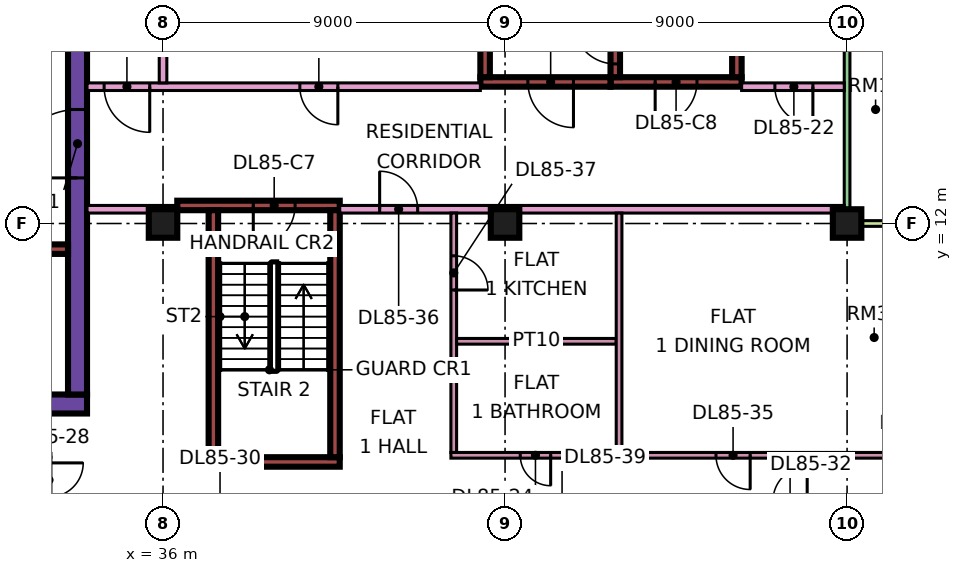
"""IFC4 building model, lengths in metres.
Left out: names, types, materials, properties, quantities, classifications, styles, units other than length and angle.
Written with IfcOpenShell. Run it as: python <this file> out.ifc"""

import sys

from ifc_helpers import new_model, si_unit, direction, frame, frame_2d, origin, origin_2d, place, context, subcontext, project, spatial, rectangle, extrude, element, fill, save


model = new_model("IFC4")
c1 = context("Model", 3, precision=1e-05, world=origin(), true_north=direction((0.0, 1.0)))
c2 = subcontext(c1, "Body", "Model", "MODEL_VIEW")
j1 = project(units=[si_unit("LENGTHUNIT", "METRE"), si_unit("PLANEANGLEUNIT", "RADIAN")], contexts=[c1])
p1 = place(None, origin())
s1 = spatial("IfcSite", under=j1, at=p1, CompositionType="ELEMENT")
p2 = place(p1, origin())
s2 = spatial("IfcBuilding", under=s1, at=p2, CompositionType="ELEMENT")
p3 = place(p2, frame((0.0, 0.0, 365.15)))
s3 = spatial("IfcBuildingStorey", under=s2, at=p3, CompositionType="ELEMENT", Elevation=365.15)
for number, where, z_axis, x_axis in (
    (1, (36.0, 12.0, 0.0), (0.0, 0.0, 1.0), (1.0, 0.0, 0.0)),
    (2, (45.0, 12.0, 0.0), (0.0, 0.0, 1.0), (1.0, 0.0, 0.0)),
    (3, (54.0, 12.0, 0.0), (0.0, 0.0, 1.0), (1.0, 0.0, 0.0)),
):
    element("IfcColumn", number, at=place(p3, frame(where, z_axis=z_axis, x_axis=x_axis)), inside=s3, PredefinedType="COLUMN", context=c2, shape_type="SweptSolid", body=[
        extrude(rectangle(XDim=0.75, YDim=0.75, at=origin_2d()), origin(), (0.0, 0.0, 1.0), 3.75),
    ])
p4 = place(p3, frame((9.0, 7.25, 0.0), z_axis=(0.0, 0.0, 1.0), x_axis=(1.0, 0.0, 0.0)))
e4 = element("IfcWall", 4, at=p4, inside=s3, PredefinedType="SHEAR", context=c2, shape_type="SweptSolid", body=[
    extrude(rectangle(XDim=25.0, YDim=0.5, at=frame_2d((12.5, 0.0))), origin(), (0.0, 0.0, 1.0), 3.75),
])
p5 = place(p3, frame((33.75, 7.5, 0.0), z_axis=(0.0, 0.0, 1.0), x_axis=(0.0, 1.0, 0.0)))
e5 = element("IfcWall", 5, at=p5, inside=s3, PredefinedType="SHEAR", context=c2, shape_type="SweptSolid", body=[
    extrude(rectangle(XDim=12.0, YDim=0.5, at=frame_2d((6.0, 0.0))), origin(), (0.0, 0.0, 1.0), 3.75),
])
p6 = place(p5, frame((5.7, 0.0, 0.0)))
e6 = element("IfcOpeningElement", 6, at=p6, cuts=e5, PredefinedType="OPENING", context=c2, shape_type="SweptSolid", body=[
    extrude(rectangle(XDim=1.8, YDim=2.4, at=frame_2d((0.9, 1.2))), frame((0.0, 0.26, 0.0), z_axis=(0.0, -1.0, 0.0), x_axis=(1.0, 0.0, 0.0)), (0.0, 0.0, 1.0), 0.52),
])
p7 = place(p3, frame((13.45, 11.325, 0.0), z_axis=(0.0, 0.0, 1.0), x_axis=(1.0, 0.0, 0.0)))
e7 = element("IfcWall", 7, at=p7, inside=s3, PredefinedType="SHEAR", context=c2, shape_type="SweptSolid", body=[
    extrude(rectangle(XDim=20.05, YDim=0.25, at=frame_2d((10.025, 0.0))), origin(), (0.0, 0.0, 1.0), 3.75),
])
p8 = place(p7, frame((4.925, 0.0, 0.0)))
e8 = element("IfcOpeningElement", 8, at=p8, cuts=e7, PredefinedType="OPENING", context=c2, shape_type="SweptSolid", body=[
    extrude(rectangle(XDim=0.9, YDim=2.1, at=frame_2d((0.45, 1.05))), frame((0.0, 0.135, 0.0), z_axis=(0.0, -1.0, 0.0), x_axis=(1.0, 0.0, 0.0)), (0.0, 0.0, 1.0), 0.27),
])
p9 = place(p7, frame((12.3, 0.0, 0.0)))
e9 = element("IfcOpeningElement", 9, at=p9, cuts=e7, PredefinedType="OPENING", context=c2, shape_type="SweptSolid", body=[
    extrude(rectangle(XDim=0.9, YDim=2.1, at=frame_2d((0.45, 1.05))), frame((0.0, 0.135, 0.0), z_axis=(0.0, -1.0, 0.0), x_axis=(1.0, 0.0, 0.0)), (0.0, 0.0, 1.0), 0.27),
])
p10 = place(p7, frame((16.825, 0.0, 0.0)))
e10 = element("IfcOpeningElement", 10, at=p10, cuts=e7, PredefinedType="OPENING", context=c2, shape_type="SweptSolid", body=[
    extrude(rectangle(XDim=0.9, YDim=2.1, at=frame_2d((0.45, 1.05))), frame((0.0, 0.135, 0.0), z_axis=(0.0, -1.0, 0.0), x_axis=(1.0, 0.0, 0.0)), (0.0, 0.0, 1.0), 0.27),
])
p11 = place(p3, frame((37.2, 5.725, 0.0), z_axis=(0.0, 0.0, 1.0), x_axis=(1.0, 0.0, 0.0)))
e11 = element("IfcWall", 11, at=p11, inside=s3, PredefinedType="SHEAR", context=c2, shape_type="SweptSolid", body=[
    extrude(rectangle(XDim=3.45, YDim=0.25, at=frame_2d((1.725, 0.0))), origin(), (0.0, 0.0, 1.0), 3.75),
])
p12 = place(p3, frame((36.375, 12.475, 0.0), z_axis=(0.0, 0.0, 1.0), x_axis=(1.0, 0.0, 0.0)))
e12 = element("IfcWall", 12, at=p12, inside=s3, PredefinedType="SHEAR", context=c2, shape_type="SweptSolid", body=[
    extrude(rectangle(XDim=4.275, YDim=0.25, at=frame_2d((2.137, 0.0))), origin(), (0.0, 0.0, 1.0), 3.75),
])
p13 = place(p12, frame((2.0, 0.0, 0.0)))
e13 = element("IfcOpeningElement", 13, at=p13, cuts=e12, PredefinedType="OPENING", context=c2, shape_type="SweptSolid", body=[
    extrude(rectangle(XDim=1.1, YDim=2.2, at=frame_2d((0.55, 1.1))), frame((0.0, 0.135, 0.0), z_axis=(0.0, -1.0, 0.0), x_axis=(1.0, 0.0, 0.0)), (0.0, 0.0, 1.0), 0.27),
])
for number, where, z_axis, x_axis in (
    (14, (37.325, 5.85, 0.0), (0.0, 0.0, 1.0), (0.0, 1.0, 0.0)),
    (15, (40.525, 5.85, 0.0), (0.0, 0.0, 1.0), (0.0, 1.0, 0.0)),
):
    element("IfcWall", number, at=place(p3, frame(where, z_axis=z_axis, x_axis=x_axis)), inside=s3, PredefinedType="SHEAR", context=c2, shape_type="SweptSolid", body=[
        extrude(rectangle(XDim=6.5, YDim=0.25, at=frame_2d((3.25, 0.0))), origin(), (0.0, 0.0, 1.0), 3.75),
    ])
p14 = place(p3, frame((47.775, 15.725, 0.0), z_axis=(0.0, 0.0, 1.0), x_axis=(1.0, 0.0, 0.0)))
e16 = element("IfcWall", 16, at=p14, inside=s3, PredefinedType="SHEAR", context=c2, shape_type="SweptSolid", body=[
    extrude(rectangle(XDim=3.45, YDim=0.25, at=frame_2d((1.725, 0.0))), origin(), (0.0, 0.0, 1.0), 3.75),
])
p15 = place(p14, frame((1.175, 0.0, 0.0)))
e17 = element("IfcOpeningElement", 17, at=p15, cuts=e16, PredefinedType="OPENING", context=c2, shape_type="SweptSolid", body=[
    extrude(rectangle(XDim=1.1, YDim=2.2, at=frame_2d((0.55, 1.1))), frame((0.0, 0.135, 0.0), z_axis=(0.0, -1.0, 0.0), x_axis=(1.0, 0.0, 0.0)), (0.0, 0.0, 1.0), 0.27),
])
p16 = place(p3, frame((47.9, 15.85, 0.0), z_axis=(0.0, 0.0, 1.0), x_axis=(0.0, 1.0, 0.0)))
e18 = element("IfcWall", 18, at=p16, inside=s3, PredefinedType="SHEAR", context=c2, shape_type="SweptSolid", body=[
    extrude(rectangle(XDim=6.5, YDim=0.25, at=frame_2d((3.25, 0.0))), origin(), (0.0, 0.0, 1.0), 3.75),
])
p17 = place(p16, frame((0.35, 0.0, 0.0)))
e19 = element("IfcOpeningElement", 19, at=p17, cuts=e18, PredefinedType="OPENING", context=c2, shape_type="SweptSolid", body=[
    extrude(rectangle(XDim=1.1, YDim=2.2, at=frame_2d((0.55, 1.1))), frame((0.0, 0.135, 0.0), z_axis=(0.0, -1.0, 0.0), x_axis=(1.0, 0.0, 0.0)), (0.0, 0.0, 1.0), 0.27),
])
p18 = place(p3, frame((51.1, 15.85, 0.0), z_axis=(0.0, 0.0, 1.0), x_axis=(0.0, 1.0, 0.0)))
e20 = element("IfcWall", 20, at=p18, inside=s3, PredefinedType="SHEAR", context=c2, shape_type="SweptSolid", body=[
    extrude(rectangle(XDim=6.5, YDim=0.25, at=frame_2d((3.25, 0.0))), origin(), (0.0, 0.0, 1.0), 3.75),
])
p19 = place(p3, frame((44.35, 15.725, 0.0), z_axis=(0.0, 0.0, 1.0), x_axis=(1.0, 0.0, 0.0)))
e21 = element("IfcWall", 21, at=p19, inside=s3, PredefinedType="SHEAR", context=c2, shape_type="SweptSolid", body=[
    extrude(rectangle(XDim=3.425, YDim=0.25, at=frame_2d((1.712, 0.0))), origin(), (0.0, 0.0, 1.0), 3.75),
])
p20 = place(p19, frame((1.25, 0.0, 0.0)))
e22 = element("IfcOpeningElement", 22, at=p20, cuts=e21, PredefinedType="OPENING", context=c2, shape_type="SweptSolid", body=[
    extrude(rectangle(XDim=1.2, YDim=2.2, at=frame_2d((0.6, 1.1))), frame((0.0, 0.135, 0.0), z_axis=(0.0, -1.0, 0.0), x_axis=(1.0, 0.0, 0.0)), (0.0, 0.0, 1.0), 0.27),
])
p21 = place(p3, frame((44.475, 15.85, 0.0), z_axis=(0.0, 0.0, 1.0), x_axis=(0.0, 1.0, 0.0)))
e23 = element("IfcWall", 23, at=p21, inside=s3, PredefinedType="SHEAR", context=c2, shape_type="SweptSolid", body=[
    extrude(rectangle(XDim=6.5, YDim=0.25, at=frame_2d((3.25, 0.0))), origin(), (0.0, 0.0, 1.0), 3.75),
])
p22 = place(p21, frame((1.75, 0.0, 0.0)))
e24 = element("IfcOpeningElement", 24, at=p22, cuts=e23, PredefinedType="OPENING", context=c2, shape_type="SweptSolid", body=[
    extrude(rectangle(XDim=1.1, YDim=2.2, at=frame_2d((0.55, 1.1))), frame((0.0, 0.135, 0.0), z_axis=(0.0, -1.0, 0.0), x_axis=(1.0, 0.0, 0.0)), (0.0, 0.0, 1.0), 0.27),
])
p23 = place(p21, frame((4.3, 0.0, 0.0)))
e25 = element("IfcOpeningElement", 25, at=p23, cuts=e23, PredefinedType="OPENING", context=c2, shape_type="SweptSolid", body=[
    extrude(rectangle(XDim=1.1, YDim=2.2, at=frame_2d((0.55, 1.1))), frame((0.0, 0.135, 0.0), z_axis=(0.0, -1.0, 0.0), x_axis=(1.0, 0.0, 0.0)), (0.0, 0.0, 1.0), 0.27),
])
p24 = place(p3, frame((54.0, 12.075, 0.0), z_axis=(0.0, 0.0, 1.0), x_axis=(0.0, 1.0, 0.0)))
e26 = element("IfcWall", 26, at=p24, inside=s3, PredefinedType="SOLIDWALL", context=c2, shape_type="SweptSolid", body=[
    extrude(rectangle(XDim=10.35, YDim=0.15, at=frame_2d((5.175, 0.0))), origin(), (0.0, 0.0, 1.0), 3.35),
])
p25 = place(p24, frame((4.538, 0.0, 0.45)))
e27 = element("IfcOpeningElement", 27, at=p25, cuts=e26, PredefinedType="OPENING", context=c2, shape_type="SweptSolid", body=[
    extrude(rectangle(XDim=4.8, YDim=2.4, at=frame_2d((2.4, 1.2))), frame((0.0, 0.085, 0.0), z_axis=(0.0, -1.0, 0.0), x_axis=(1.0, 0.0, 0.0)), (0.0, 0.0, 1.0), 0.17),
])
p26 = place(p3, frame((55.5, 12.0, 0.0), z_axis=(0.0, 0.0, 1.0), x_axis=(-1.0, 0.0, 0.0)))
e28 = element("IfcWall", 28, at=p26, inside=s3, PredefinedType="SOLIDWALL", context=c2, shape_type="SweptSolid", body=[
    extrude(rectangle(XDim=1.5, YDim=0.15, at=frame_2d((0.75, 0.0))), origin(), (0.0, 0.0, 1.0), 3.35),
])
p27 = place(p3, frame((34.0, 12.375, 0.0), z_axis=(0.0, 0.0, 1.0), x_axis=(1.0, 0.0, 0.0)))
e29 = element("IfcWall", 29, at=p27, inside=s3, PredefinedType="PARTITIONING", context=c2, shape_type="SweptSolid", body=[
    extrude(rectangle(XDim=2.376, YDim=0.2, at=frame_2d((1.188, 0.0))), origin(), (0.0, 0.0, 1.0), 3.35),
])
p28 = place(p3, frame((34.0, 15.6, 0.0), z_axis=(0.0, 0.0, 1.0), x_axis=(1.0, 0.0, 0.0)))
e30 = element("IfcWall", 30, at=p28, inside=s3, PredefinedType="PARTITIONING", context=c2, shape_type="SweptSolid", body=[
    extrude(rectangle(XDim=10.35, YDim=0.2, at=frame_2d((5.175, 0.0))), origin(), (0.0, 0.0, 1.0), 3.35),
])
p29 = place(p28, frame((5.6, 0.0, 0.0)))
e31 = element("IfcOpeningElement", 31, at=p29, cuts=e30, PredefinedType="OPENING", context=c2, shape_type="SweptSolid", body=[
    extrude(rectangle(XDim=1.0, YDim=2.1, at=frame_2d((0.5, 1.05))), frame((0.0, 0.11, 0.0), z_axis=(0.0, -1.0, 0.0), x_axis=(1.0, 0.0, 0.0)), (0.0, 0.0, 1.0), 0.22),
])
p30 = place(p28, frame((0.45, 0.0, 0.0)))
e32 = element("IfcOpeningElement", 32, at=p30, cuts=e30, PredefinedType="OPENING", context=c2, shape_type="SweptSolid", body=[
    extrude(rectangle(XDim=1.2, YDim=2.1, at=frame_2d((0.6, 1.05))), frame((0.0, 0.11, 0.0), z_axis=(0.0, -1.0, 0.0), x_axis=(1.0, 0.0, 0.0)), (0.0, 0.0, 1.0), 0.22),
])
p31 = place(p3, frame((36.0, 15.7, 0.0), z_axis=(0.0, 0.0, 1.0), x_axis=(0.0, 1.0, 0.0)))
e33 = element("IfcWall", 33, at=p31, inside=s3, PredefinedType="PARTITIONING", context=c2, shape_type="SweptSolid", body=[
    extrude(rectangle(XDim=8.3, YDim=0.2, at=frame_2d((4.15, 0.0))), origin(), (0.0, 0.0, 1.0), 3.35),
])
p32 = place(p3, frame((40.65, 12.375, 0.0), z_axis=(0.0, 0.0, 1.0), x_axis=(1.0, 0.0, 0.0)))
e34 = element("IfcWall", 34, at=p32, inside=s3, PredefinedType="PARTITIONING", context=c2, shape_type="SweptSolid", body=[
    extrude(rectangle(XDim=13.276, YDim=0.2, at=frame_2d((6.638, 0.0))), origin(), (0.0, 0.0, 1.0), 3.35),
])
p33 = place(p32, frame((1.05, 0.0, 0.0)))
e35 = element("IfcOpeningElement", 35, at=p33, cuts=e34, PredefinedType="OPENING", context=c2, shape_type="SweptSolid", body=[
    extrude(rectangle(XDim=1.0, YDim=2.1, at=frame_2d((0.5, 1.05))), frame((0.0, 0.11, 0.0), z_axis=(0.0, -1.0, 0.0), x_axis=(1.0, 0.0, 0.0)), (0.0, 0.0, 1.0), 0.22),
])
p34 = place(p3, frame((43.575, 5.9, 0.0), z_axis=(0.0, 0.0, 1.0), x_axis=(1.0, 0.0, 0.0)))
e36 = element("IfcWall", 36, at=p34, inside=s3, PredefinedType="PARTITIONING", context=c2, shape_type="SweptSolid", body=[
    extrude(rectangle(XDim=11.775, YDim=0.15, at=frame_2d((5.888, 0.0))), origin(), (0.0, 0.0, 1.0), 3.35),
])
p35 = place(p34, frame((1.825, 0.0, 0.0)))
e37 = element("IfcOpeningElement", 37, at=p35, cuts=e36, PredefinedType="OPENING", context=c2, shape_type="SweptSolid", body=[
    extrude(rectangle(XDim=0.8, YDim=2.1, at=frame_2d((0.4, 1.05))), frame((0.0, 0.085, 0.0), z_axis=(0.0, -1.0, 0.0), x_axis=(1.0, 0.0, 0.0)), (0.0, 0.0, 1.0), 0.17),
])
p36 = place(p34, frame((6.975, 0.0, 0.0)))
e38 = element("IfcOpeningElement", 38, at=p36, cuts=e36, PredefinedType="OPENING", context=c2, shape_type="SweptSolid", body=[
    extrude(rectangle(XDim=0.9, YDim=2.1, at=frame_2d((0.45, 1.05))), frame((0.0, 0.085, 0.0), z_axis=(0.0, -1.0, 0.0), x_axis=(1.0, 0.0, 0.0)), (0.0, 0.0, 1.0), 0.17),
])
p37 = place(p3, frame((43.65, 5.975, 0.0), z_axis=(0.0, 0.0, 1.0), x_axis=(0.0, 1.0, 0.0)))
e39 = element("IfcWall", 39, at=p37, inside=s3, PredefinedType="PARTITIONING", context=c2, shape_type="SweptSolid", body=[
    extrude(rectangle(XDim=6.3, YDim=0.15, at=frame_2d((3.15, 0.0))), origin(), (0.0, 0.0, 1.0), 3.35),
])
p38 = place(p37, frame((4.275, 0.0, 0.0)))
e40 = element("IfcOpeningElement", 40, at=p38, cuts=e39, PredefinedType="OPENING", context=c2, shape_type="SweptSolid", body=[
    extrude(rectangle(XDim=0.9, YDim=2.1, at=frame_2d((0.45, 1.05))), frame((0.0, 0.085, 0.0), z_axis=(0.0, -1.0, 0.0), x_axis=(1.0, 0.0, 0.0)), (0.0, 0.0, 1.0), 0.17),
])
p39 = place(p3, frame((43.725, 8.9, 0.0), z_axis=(0.0, 0.0, 1.0), x_axis=(1.0, 0.0, 0.0)))
e41 = element("IfcWall", 41, at=p39, inside=s3, PredefinedType="PARTITIONING", context=c2, shape_type="SweptSolid", body=[
    extrude(rectangle(XDim=4.2, YDim=0.15, at=frame_2d((2.1, 0.0))), origin(), (0.0, 0.0, 1.0), 3.35),
])
p40 = place(p3, frame((48.0, 5.975, 0.0), z_axis=(0.0, 0.0, 1.0), x_axis=(0.0, 1.0, 0.0)))
e42 = element("IfcWall", 42, at=p40, inside=s3, PredefinedType="PARTITIONING", context=c2, shape_type="SweptSolid", body=[
    extrude(rectangle(XDim=6.3, YDim=0.15, at=frame_2d((3.15, 0.0))), origin(), (0.0, 0.0, 1.0), 3.35),
])
p41 = place(p3, frame((51.225, 15.6, 0.0), z_axis=(0.0, 0.0, 1.0), x_axis=(1.0, 0.0, 0.0)))
e43 = element("IfcWall", 43, at=p41, inside=s3, PredefinedType="PARTITIONING", context=c2, shape_type="SweptSolid", body=[
    extrude(rectangle(XDim=2.701, YDim=0.2, at=frame_2d((1.351, 0.0))), origin(), (0.0, 0.0, 1.0), 3.35),
])
p42 = place(p41, frame((0.875, 0.0, 0.0)))
e44 = element("IfcOpeningElement", 44, at=p42, cuts=e43, PredefinedType="OPENING", context=c2, shape_type="SweptSolid", body=[
    extrude(rectangle(XDim=1.0, YDim=2.1, at=frame_2d((0.5, 1.05))), frame((0.0, 0.11, 0.0), z_axis=(0.0, -1.0, 0.0), x_axis=(1.0, 0.0, 0.0)), (0.0, 0.0, 1.0), 0.22),
])
p43 = place(p6, origin())
e45 = element("IfcDoor", 45, at=p43, inside=s3, OperationType="DOUBLE_DOOR_SINGLE_SWING", PredefinedType="DOOR", context=c2, shape_type="SweptSolid", body=[
    extrude(rectangle(XDim=1.8, YDim=2.4, at=frame_2d((0.9, 1.2))), frame((0.0, 0.025, 0.0), z_axis=(0.0, -1.0, 0.0), x_axis=(1.0, 0.0, 0.0)), (0.0, 0.0, 1.0), 0.05),
])
fill(e6, e45)
p44 = place(p13, frame((1.1, 0.0, 0.0), z_axis=(0.0, 0.0, 1.0), x_axis=(-1.0, 0.0, 0.0)))
e46 = element("IfcDoor", 46, at=p44, inside=s3, OperationType="SINGLE_SWING_LEFT", PredefinedType="DOOR", context=c2, shape_type="SweptSolid", body=[
    extrude(rectangle(XDim=1.1, YDim=2.2, at=frame_2d((0.55, 1.1))), frame((0.0, 0.025, 0.0), z_axis=(0.0, -1.0, 0.0), x_axis=(1.0, 0.0, 0.0)), (0.0, 0.0, 1.0), 0.05),
])
fill(e13, e46)
p45 = place(p15, frame((1.1, 0.0, 0.0), z_axis=(0.0, 0.0, 1.0), x_axis=(-1.0, 0.0, 0.0)))
e47 = element("IfcDoor", 47, at=p45, inside=s3, OperationType="SINGLE_SWING_LEFT", PredefinedType="DOOR", context=c2, shape_type="SweptSolid", body=[
    extrude(rectangle(XDim=1.1, YDim=2.2, at=frame_2d((0.55, 1.1))), frame((0.0, 0.025, 0.0), z_axis=(0.0, -1.0, 0.0), x_axis=(1.0, 0.0, 0.0)), (0.0, 0.0, 1.0), 0.05),
])
fill(e17, e47)
p46 = place(p20, origin())
e48 = element("IfcDoor", 48, at=p46, inside=s3, OperationType="SINGLE_SWING_RIGHT", PredefinedType="DOOR", context=c2, shape_type="SweptSolid", body=[
    extrude(rectangle(XDim=1.2, YDim=2.2, at=frame_2d((0.6, 1.1))), frame((0.0, 0.025, 0.0), z_axis=(0.0, -1.0, 0.0), x_axis=(1.0, 0.0, 0.0)), (0.0, 0.0, 1.0), 0.05),
])
fill(e22, e48)
p47 = place(p17, frame((1.1, 0.0, 0.0), z_axis=(0.0, 0.0, 1.0), x_axis=(-1.0, 0.0, 0.0)))
e49 = element("IfcDoor", 49, at=p47, inside=s3, OperationType="SINGLE_SWING_RIGHT", PredefinedType="DOOR", context=c2, shape_type="SweptSolid", body=[
    extrude(rectangle(XDim=1.1, YDim=2.2, at=frame_2d((0.55, 1.1))), frame((0.0, 0.025, 0.0), z_axis=(0.0, -1.0, 0.0), x_axis=(1.0, 0.0, 0.0)), (0.0, 0.0, 1.0), 0.05),
])
fill(e19, e49)
p48 = place(p29, origin())
e50 = element("IfcDoor", 50, at=p48, inside=s3, OperationType="SINGLE_SWING_RIGHT", PredefinedType="DOOR", context=c2, shape_type="SweptSolid", body=[
    extrude(rectangle(XDim=1.0, YDim=2.1, at=frame_2d((0.5, 1.05))), frame((0.0, 0.025, 0.0), z_axis=(0.0, -1.0, 0.0), x_axis=(1.0, 0.0, 0.0)), (0.0, 0.0, 1.0), 0.05),
])
fill(e31, e50)
p49 = place(p30, origin())
e51 = element("IfcDoor", 51, at=p49, inside=s3, OperationType="SINGLE_SWING_RIGHT", PredefinedType="DOOR", context=c2, shape_type="SweptSolid", body=[
    extrude(rectangle(XDim=1.2, YDim=2.1, at=frame_2d((0.6, 1.05))), frame((0.0, 0.025, 0.0), z_axis=(0.0, -1.0, 0.0), x_axis=(1.0, 0.0, 0.0)), (0.0, 0.0, 1.0), 0.05),
])
fill(e32, e51)
p50 = place(p42, origin())
e52 = element("IfcDoor", 52, at=p50, inside=s3, OperationType="SINGLE_SWING_RIGHT", PredefinedType="DOOR", context=c2, shape_type="SweptSolid", body=[
    extrude(rectangle(XDim=1.0, YDim=2.1, at=frame_2d((0.5, 1.05))), frame((0.0, 0.025, 0.0), z_axis=(0.0, -1.0, 0.0), x_axis=(1.0, 0.0, 0.0)), (0.0, 0.0, 1.0), 0.05),
])
fill(e44, e52)
p51 = place(p35, origin())
e53 = element("IfcDoor", 53, at=p51, inside=s3, OperationType="SINGLE_SWING_RIGHT", PredefinedType="DOOR", context=c2, shape_type="SweptSolid", body=[
    extrude(rectangle(XDim=0.8, YDim=2.1, at=frame_2d((0.4, 1.05))), frame((0.0, 0.025, 0.0), z_axis=(0.0, -1.0, 0.0), x_axis=(1.0, 0.0, 0.0)), (0.0, 0.0, 1.0), 0.05),
])
fill(e37, e53)
p52 = place(p36, origin())
e54 = element("IfcDoor", 54, at=p52, inside=s3, OperationType="SINGLE_SWING_RIGHT", PredefinedType="DOOR", context=c2, shape_type="SweptSolid", body=[
    extrude(rectangle(XDim=0.9, YDim=2.1, at=frame_2d((0.45, 1.05))), frame((0.0, 0.025, 0.0), z_axis=(0.0, -1.0, 0.0), x_axis=(1.0, 0.0, 0.0)), (0.0, 0.0, 1.0), 0.05),
])
fill(e38, e54)
p53 = place(p33, origin())
e55 = element("IfcDoor", 55, at=p53, inside=s3, OperationType="SINGLE_SWING_LEFT", PredefinedType="DOOR", context=c2, shape_type="SweptSolid", body=[
    extrude(rectangle(XDim=1.0, YDim=2.1, at=frame_2d((0.5, 1.05))), frame((0.0, 0.025, 0.0), z_axis=(0.0, -1.0, 0.0), x_axis=(1.0, 0.0, 0.0)), (0.0, 0.0, 1.0), 0.05),
])
fill(e35, e55)
p54 = place(p38, frame((0.9, 0.0, 0.0), z_axis=(0.0, 0.0, 1.0), x_axis=(-1.0, 0.0, 0.0)))
e56 = element("IfcDoor", 56, at=p54, inside=s3, OperationType="SINGLE_SWING_LEFT", PredefinedType="DOOR", context=c2, shape_type="SweptSolid", body=[
    extrude(rectangle(XDim=0.9, YDim=2.1, at=frame_2d((0.45, 1.05))), frame((0.0, 0.025, 0.0), z_axis=(0.0, -1.0, 0.0), x_axis=(1.0, 0.0, 0.0)), (0.0, 0.0, 1.0), 0.05),
])
fill(e40, e56)
save(model, sys.argv[1])
